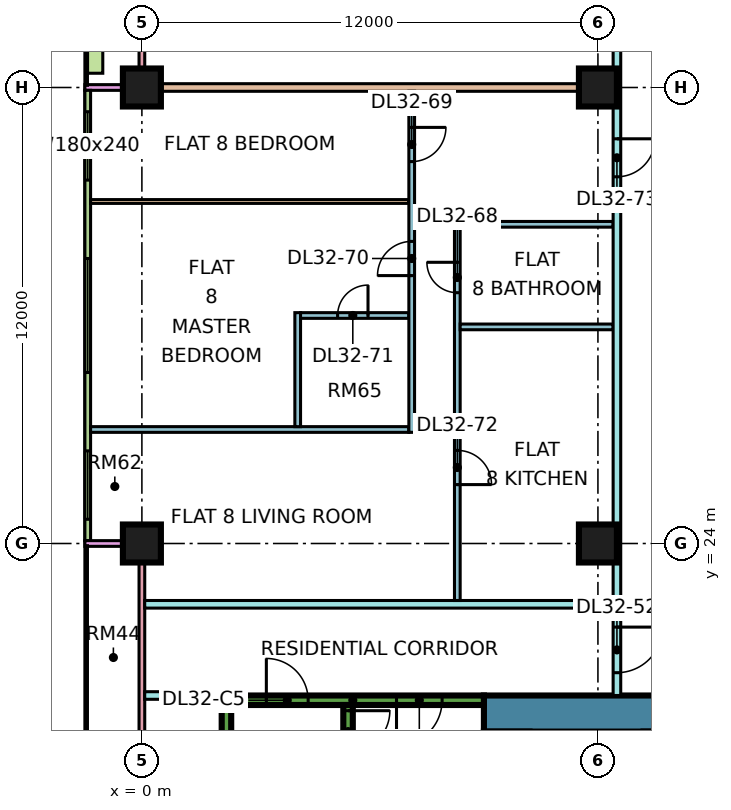
"""IFC4 building model, lengths in metres.
Left out: names, types, materials, properties, quantities, classifications, styles, units other than length and angle.
Written with IfcOpenShell. Run it as: python <this file> out.ifc"""

import sys

from ifc_helpers import new_model, si_unit, direction, frame, frame_2d, origin, origin_2d, place, context, subcontext, project, spatial, rectangle, extrude, element, fill, save


model = new_model("IFC4")
c1 = context("Model", 3, precision=1e-05, world=origin(), true_north=direction((0.0, 1.0)))
c2 = subcontext(c1, "Body", "Model", "MODEL_VIEW")
j1 = project(units=[si_unit("LENGTHUNIT", "METRE"), si_unit("PLANEANGLEUNIT", "RADIAN")], contexts=[c1])
p1 = place(None, origin())
s1 = spatial("IfcSite", under=j1, at=p1, CompositionType="ELEMENT")
p2 = place(p1, origin())
s2 = spatial("IfcBuilding", under=s1, at=p2, CompositionType="ELEMENT")
p3 = place(p2, frame((0.0, 0.0, 136.9)))
s3 = spatial("IfcBuildingStorey", under=s2, at=p3, CompositionType="ELEMENT", Elevation=136.9)
p4 = place(p3, frame((0.0, 24.0, 0.0), z_axis=(0.0, 0.0, 1.0), x_axis=(1.0, 0.0, 0.0)))
e1 = element("IfcColumn", 1, at=p4, inside=s3, PredefinedType="COLUMN", context=c2, shape_type="SweptSolid", body=[
    extrude(rectangle(XDim=1.0, YDim=1.0, at=origin_2d()), origin(), (0.0, 0.0, 1.0), 3.75),
])
p5 = place(p3, frame((0.0, 36.0, 0.0), z_axis=(0.0, 0.0, 1.0), x_axis=(1.0, 0.0, 0.0)))
e2 = element("IfcColumn", 2, at=p5, inside=s3, PredefinedType="COLUMN", context=c2, shape_type="SweptSolid", body=[
    extrude(rectangle(XDim=1.0, YDim=1.0, at=origin_2d()), origin(), (0.0, 0.0, 1.0), 3.75),
])
for number, where, z_axis, x_axis in (
    (3, (12.0, 24.0, 0.0), (0.0, 0.0, 1.0), (1.0, 0.0, 0.0)),
    (4, (12.0, 36.0, 0.0), (0.0, 0.0, 1.0), (1.0, 0.0, 0.0)),
):
    element("IfcColumn", number, at=place(p3, frame(where, z_axis=z_axis, x_axis=x_axis)), inside=s3, PredefinedType="COLUMN", context=c2, shape_type="SweptSolid", body=[
        extrude(rectangle(XDim=1.0, YDim=1.0, at=origin_2d()), origin(), (0.0, 0.0, 1.0), 3.75),
    ])
p6 = place(p3, frame((9.0, 19.525, 0.0), z_axis=(0.0, 0.0, 1.0), x_axis=(1.0, 0.0, 0.0)))
e5 = element("IfcWall", 5, at=p6, inside=s3, PredefinedType="SHEAR", context=c2, shape_type="SweptSolid", body=[
    extrude(rectangle(XDim=25.0, YDim=0.95, at=frame_2d((12.5, 0.0))), origin(), (0.0, 0.0, 1.0), 3.75),
])
p7 = place(p6, frame((19.1, 0.0, 0.0)))
e6 = element("IfcOpeningElement", 6, at=p7, cuts=e5, PredefinedType="OPENING", context=c2, shape_type="SweptSolid", body=[
    extrude(rectangle(XDim=1.8, YDim=2.4, at=frame_2d((0.9, 1.2))), frame((0.0, 0.485, 0.0), z_axis=(0.0, -1.0, 0.0), x_axis=(1.0, 0.0, 0.0)), (0.0, 0.0, 1.0), 0.97),
])
p8 = place(p3, frame((2.1, 19.875, 0.0), z_axis=(0.0, 0.0, 1.0), x_axis=(1.0, 0.0, 0.0)))
e7 = element("IfcWall", 7, at=p8, inside=s3, PredefinedType="SHEAR", context=c2, shape_type="SweptSolid", body=[
    extrude(rectangle(XDim=6.9, YDim=0.25, at=frame_2d((3.45, 0.0))), origin(), (0.0, 0.0, 1.0), 3.75),
])
p9 = place(p8, frame((1.175, 0.0, 0.0)))
e8 = element("IfcOpeningElement", 8, at=p9, cuts=e7, PredefinedType="OPENING", context=c2, shape_type="SweptSolid", body=[
    extrude(rectangle(XDim=1.1, YDim=2.2, at=frame_2d((0.55, 1.1))), frame((0.0, 0.135, 0.0), z_axis=(0.0, -1.0, 0.0), x_axis=(1.0, 0.0, 0.0)), (0.0, 0.0, 1.0), 0.27),
])
p10 = place(p8, frame((4.6, 0.0, 0.0)))
e9 = element("IfcOpeningElement", 9, at=p10, cuts=e7, PredefinedType="OPENING", context=c2, shape_type="SweptSolid", body=[
    extrude(rectangle(XDim=1.2, YDim=2.2, at=frame_2d((0.6, 1.1))), frame((0.0, 0.135, 0.0), z_axis=(0.0, -1.0, 0.0), x_axis=(1.0, 0.0, 0.0)), (0.0, 0.0, 1.0), 0.27),
])
p11 = place(p3, frame((2.225, 13.25, 0.0), z_axis=(0.0, 0.0, 1.0), x_axis=(0.0, 1.0, 0.0)))
e10 = element("IfcWall", 10, at=p11, inside=s3, PredefinedType="SHEAR", context=c2, shape_type="SweptSolid", body=[
    extrude(rectangle(XDim=6.5, YDim=0.25, at=frame_2d((3.25, 0.0))), origin(), (0.0, 0.0, 1.0), 3.75),
])
p12 = place(p3, frame((5.425, 13.25, 0.0), z_axis=(0.0, 0.0, 1.0), x_axis=(0.0, 1.0, 0.0)))
e11 = element("IfcWall", 11, at=p12, inside=s3, PredefinedType="SHEAR", context=c2, shape_type="SweptSolid", body=[
    extrude(rectangle(XDim=6.5, YDim=0.25, at=frame_2d((3.25, 0.0))), origin(), (0.0, 0.0, 1.0), 3.75),
])
p13 = place(p12, frame((5.25, 0.0, 0.0)))
e12 = element("IfcOpeningElement", 12, at=p13, cuts=e11, PredefinedType="OPENING", context=c2, shape_type="SweptSolid", body=[
    extrude(rectangle(XDim=1.1, YDim=2.2, at=frame_2d((0.55, 1.1))), frame((0.0, 0.135, 0.0), z_axis=(0.0, -1.0, 0.0), x_axis=(1.0, 0.0, 0.0)), (0.0, 0.0, 1.0), 0.27),
])
p14 = place(p3, frame((0.0, 47.925, 0.0), z_axis=(0.0, 0.0, 1.0), x_axis=(0.0, -1.0, 0.0)))
e13 = element("IfcWall", 13, at=p14, inside=s3, PredefinedType="SOLIDWALL", context=c2, shape_type="SweptSolid", body=[
    extrude(rectangle(XDim=11.85, YDim=0.15, at=frame_2d((5.925, 0.0))), origin(), (0.0, 0.0, 1.0), 3.3),
])
p15 = place(p14, frame((0.562, 0.0, 0.45)))
e14 = element("IfcOpeningElement", 14, at=p15, cuts=e13, PredefinedType="OPENING", context=c2, shape_type="SweptSolid", body=[
    extrude(rectangle(XDim=1.2, YDim=2.4, at=frame_2d((0.6, 1.2))), frame((0.0, 0.085, 0.0), z_axis=(0.0, -1.0, 0.0), x_axis=(1.0, 0.0, 0.0)), (0.0, 0.0, 1.0), 0.17),
])
p16 = place(p14, frame((4.125, 0.0, 0.0)))
e15 = element("IfcOpeningElement", 15, at=p16, cuts=e13, PredefinedType="OPENING", context=c2, shape_type="SweptSolid", body=[
    extrude(rectangle(XDim=1.2, YDim=2.4, at=frame_2d((0.6, 1.2))), frame((0.0, 0.085, 0.0), z_axis=(0.0, -1.0, 0.0), x_axis=(1.0, 0.0, 0.0)), (0.0, 0.0, 1.0), 0.17),
])
p17 = place(p14, frame((7.125, 0.0, 0.45)))
e16 = element("IfcOpeningElement", 16, at=p17, cuts=e13, PredefinedType="OPENING", context=c2, shape_type="SweptSolid", body=[
    extrude(rectangle(XDim=3.0, YDim=2.4, at=frame_2d((1.5, 1.2))), frame((0.0, 0.085, 0.0), z_axis=(0.0, -1.0, 0.0), x_axis=(1.0, 0.0, 0.0)), (0.0, 0.0, 1.0), 0.17),
])
p18 = place(p3, frame((-1.5, 36.0, 0.0), z_axis=(0.0, 0.0, 1.0), x_axis=(1.0, 0.0, 0.0)))
e17 = element("IfcWall", 17, at=p18, inside=s3, PredefinedType="SOLIDWALL", context=c2, shape_type="SweptSolid", body=[
    extrude(rectangle(XDim=1.5, YDim=0.15, at=frame_2d((0.75, 0.0))), origin(), (0.0, 0.0, 1.0), 3.3),
])
p19 = place(p3, frame((-1.425, 35.925, 0.0), z_axis=(0.0, 0.0, 1.0), x_axis=(0.0, -1.0, 0.0)))
e18 = element("IfcWall", 18, at=p19, inside=s3, PredefinedType="SOLIDWALL", context=c2, shape_type="SweptSolid", body=[
    extrude(rectangle(XDim=11.85, YDim=0.15, at=frame_2d((5.925, 0.0))), origin(), (0.0, 0.0, 1.0), 3.3),
])
p20 = place(p19, frame((0.562, 0.0, 0.45)))
e19 = element("IfcOpeningElement", 19, at=p20, cuts=e18, PredefinedType="OPENING", context=c2, shape_type="SweptSolid", body=[
    extrude(rectangle(XDim=1.8, YDim=2.4, at=frame_2d((0.9, 1.2))), frame((0.0, 0.085, 0.0), z_axis=(0.0, -1.0, 0.0), x_axis=(1.0, 0.0, 0.0)), (0.0, 0.0, 1.0), 0.17),
])
p21 = place(p19, frame((4.425, 0.0, 0.45)))
e20 = element("IfcOpeningElement", 20, at=p21, cuts=e18, PredefinedType="OPENING", context=c2, shape_type="SweptSolid", body=[
    extrude(rectangle(XDim=3.0, YDim=2.4, at=frame_2d((1.5, 1.2))), frame((0.0, 0.085, 0.0), z_axis=(0.0, -1.0, 0.0), x_axis=(1.0, 0.0, 0.0)), (0.0, 0.0, 1.0), 0.17),
])
p22 = place(p19, frame((9.488, 0.0, 0.45)))
e21 = element("IfcOpeningElement", 21, at=p22, cuts=e18, PredefinedType="OPENING", context=c2, shape_type="SweptSolid", body=[
    extrude(rectangle(XDim=1.8, YDim=2.4, at=frame_2d((0.9, 1.2))), frame((0.0, 0.085, 0.0), z_axis=(0.0, -1.0, 0.0), x_axis=(1.0, 0.0, 0.0)), (0.0, 0.0, 1.0), 0.17),
])
p23 = place(p3, frame((0.0, 23.925, 0.0), z_axis=(0.0, 0.0, 1.0), x_axis=(0.0, -1.0, 0.0)))
e22 = element("IfcWall", 22, at=p23, inside=s3, PredefinedType="SOLIDWALL", context=c2, shape_type="SweptSolid", body=[
    extrude(rectangle(XDim=11.35, YDim=0.15, at=frame_2d((5.675, 0.0))), origin(), (0.0, 0.0, 1.0), 3.3),
])
p24 = place(p23, frame((6.738, 0.0, 0.0)))
e23 = element("IfcOpeningElement", 23, at=p24, cuts=e22, PredefinedType="OPENING", context=c2, shape_type="SweptSolid", body=[
    extrude(rectangle(XDim=1.8, YDim=2.4, at=frame_2d((0.9, 1.2))), frame((0.0, 0.085, 0.0), z_axis=(0.0, -1.0, 0.0), x_axis=(1.0, 0.0, 0.0)), (0.0, 0.0, 1.0), 0.17),
])
p25 = place(p3, frame((-1.5, 24.0, 0.0), z_axis=(0.0, 0.0, 1.0), x_axis=(1.0, 0.0, 0.0)))
e24 = element("IfcWall", 24, at=p25, inside=s3, PredefinedType="SOLIDWALL", context=c2, shape_type="SweptSolid", body=[
    extrude(rectangle(XDim=1.5, YDim=0.15, at=frame_2d((0.75, 0.0))), origin(), (0.0, 0.0, 1.0), 3.3),
])
p26 = place(p3, frame((-1.229, 47.625, 0.0), z_axis=(0.0, 0.0, 1.0), x_axis=(0.0, -1.0, 0.0)))
e25 = element("IfcWall", 25, at=p26, inside=s3, PredefinedType="SOLIDWALL", context=c2, shape_type="SweptSolid", body=[
    extrude(rectangle(XDim=11.25, YDim=0.4, at=frame_2d((5.625, 0.0))), origin(), (0.0, 0.0, 1.0), 0.7),
])
p27 = place(p3, frame((-1.351, 33.0, 0.0), z_axis=(0.0, 0.0, 1.0), x_axis=(1.0, 0.0, 0.0)))
e26 = element("IfcWall", 26, at=p27, inside=s3, PredefinedType="PARTITIONING", context=c2, shape_type="SweptSolid", body=[
    extrude(rectangle(XDim=8.376, YDim=0.1, at=frame_2d((4.188, 0.0))), origin(), (0.0, 0.0, 1.0), 3.3),
])
p28 = place(p3, frame((-1.35, 27.0, 0.0), z_axis=(0.0, 0.0, 1.0), x_axis=(1.0, 0.0, 0.0)))
e27 = element("IfcWall", 27, at=p28, inside=s3, PredefinedType="PARTITIONING", context=c2, shape_type="SweptSolid", body=[
    extrude(rectangle(XDim=8.375, YDim=0.15, at=frame_2d((4.188, 0.0))), origin(), (0.0, 0.0, 1.0), 3.3),
])
e28 = element("IfcWall", 28, at=p5, inside=s3, PredefinedType="PARTITIONING", context=c2, shape_type="SweptSolid", body=[
    extrude(rectangle(XDim=12.4, YDim=0.2, at=frame_2d((6.2, 0.0))), origin(), (0.0, 0.0, 1.0), 3.3),
])
p29 = place(p3, frame((0.074, 20.0, 0.0), z_axis=(0.0, 0.0, 1.0), x_axis=(1.0, 0.0, 0.0)))
e29 = element("IfcWall", 29, at=p29, inside=s3, PredefinedType="PARTITIONING", context=c2, shape_type="SweptSolid", body=[
    extrude(rectangle(XDim=2.026, YDim=0.2, at=frame_2d((1.013, 0.0))), origin(), (0.0, 0.0, 1.0), 3.3),
])
p30 = place(p3, frame((0.074, 22.4, 0.0), z_axis=(0.0, 0.0, 1.0), x_axis=(1.0, 0.0, 0.0)))
e30 = element("IfcWall", 30, at=p30, inside=s3, PredefinedType="PARTITIONING", context=c2, shape_type="SweptSolid", body=[
    extrude(rectangle(XDim=12.326, YDim=0.2, at=frame_2d((6.163, 0.0))), origin(), (0.0, 0.0, 1.0), 3.3),
])
p31 = place(p3, frame((4.1, 27.075, 0.0), z_axis=(0.0, 0.0, 1.0), x_axis=(0.0, 1.0, 0.0)))
e31 = element("IfcWall", 31, at=p31, inside=s3, PredefinedType="PARTITIONING", context=c2, shape_type="SweptSolid", body=[
    extrude(rectangle(XDim=3.0, YDim=0.15, at=frame_2d((1.5, 0.0))), origin(), (0.0, 0.0, 1.0), 3.3),
])
p32 = place(p3, frame((4.175, 30.0, 0.0), z_axis=(0.0, 0.0, 1.0), x_axis=(1.0, 0.0, 0.0)))
e32 = element("IfcWall", 32, at=p32, inside=s3, PredefinedType="PARTITIONING", context=c2, shape_type="SweptSolid", body=[
    extrude(rectangle(XDim=2.85, YDim=0.15, at=frame_2d((1.425, 0.0))), origin(), (0.0, 0.0, 1.0), 3.3),
])
p33 = place(p32, frame((0.975, 0.0, 0.0)))
e33 = element("IfcOpeningElement", 33, at=p33, cuts=e32, PredefinedType="OPENING", context=c2, shape_type="SweptSolid", body=[
    extrude(rectangle(XDim=0.8, YDim=2.1, at=frame_2d((0.4, 1.05))), frame((0.0, 0.085, 0.0), z_axis=(0.0, -1.0, 0.0), x_axis=(1.0, 0.0, 0.0)), (0.0, 0.0, 1.0), 0.17),
])
p34 = place(p3, frame((7.1, 26.925, 0.0), z_axis=(0.0, 0.0, 1.0), x_axis=(0.0, 1.0, 0.0)))
e34 = element("IfcWall", 34, at=p34, inside=s3, PredefinedType="PARTITIONING", context=c2, shape_type="SweptSolid", body=[
    extrude(rectangle(XDim=8.975, YDim=0.15, at=frame_2d((4.487, 0.0))), origin(), (0.0, 0.0, 1.0), 3.3),
])
p35 = place(p34, frame((7.125, 0.0, 0.0)))
e35 = element("IfcOpeningElement", 35, at=p35, cuts=e34, PredefinedType="OPENING", context=c2, shape_type="SweptSolid", body=[
    extrude(rectangle(XDim=0.9, YDim=2.1, at=frame_2d((0.45, 1.05))), frame((0.0, 0.085, 0.0), z_axis=(0.0, -1.0, 0.0), x_axis=(1.0, 0.0, 0.0)), (0.0, 0.0, 1.0), 0.17),
])
p36 = place(p34, frame((4.125, 0.0, 0.0)))
e36 = element("IfcOpeningElement", 36, at=p36, cuts=e34, PredefinedType="OPENING", context=c2, shape_type="SweptSolid", body=[
    extrude(rectangle(XDim=0.9, YDim=2.1, at=frame_2d((0.45, 1.05))), frame((0.0, 0.085, 0.0), z_axis=(0.0, -1.0, 0.0), x_axis=(1.0, 0.0, 0.0)), (0.0, 0.0, 1.0), 0.17),
])
p37 = place(p3, frame((8.3, 22.5, 0.0), z_axis=(0.0, 0.0, 1.0), x_axis=(0.0, 1.0, 0.0)))
e37 = element("IfcWall", 37, at=p37, inside=s3, PredefinedType="PARTITIONING", context=c2, shape_type="SweptSolid", body=[
    extrude(rectangle(XDim=9.975, YDim=0.15, at=frame_2d((4.988, 0.0))), origin(), (0.0, 0.0, 1.0), 3.3),
])
p38 = place(p37, frame((8.1, 0.0, 0.0)))
e38 = element("IfcOpeningElement", 38, at=p38, cuts=e37, PredefinedType="OPENING", context=c2, shape_type="SweptSolid", body=[
    extrude(rectangle(XDim=0.8, YDim=2.1, at=frame_2d((0.4, 1.05))), frame((0.0, 0.085, 0.0), z_axis=(0.0, -1.0, 0.0), x_axis=(1.0, 0.0, 0.0)), (0.0, 0.0, 1.0), 0.17),
])
p39 = place(p37, frame((3.05, 0.0, 0.0)))
e39 = element("IfcOpeningElement", 39, at=p39, cuts=e37, PredefinedType="OPENING", context=c2, shape_type="SweptSolid", body=[
    extrude(rectangle(XDim=0.9, YDim=2.1, at=frame_2d((0.45, 1.05))), frame((0.0, 0.085, 0.0), z_axis=(0.0, -1.0, 0.0), x_axis=(1.0, 0.0, 0.0)), (0.0, 0.0, 1.0), 0.17),
])
for number, where, z_axis, x_axis in (
    (40, (8.375, 29.7, 0.0), (0.0, 0.0, 1.0), (1.0, 0.0, 0.0)),
    (41, (8.375, 32.4, 0.0), (0.0, 0.0, 1.0), (1.0, 0.0, 0.0)),
):
    element("IfcWall", number, at=place(p3, frame(where, z_axis=z_axis, x_axis=x_axis)), inside=s3, PredefinedType="PARTITIONING", context=c2, shape_type="SweptSolid", body=[
        extrude(rectangle(XDim=4.025, YDim=0.15, at=frame_2d((2.012, 0.0))), origin(), (0.0, 0.0, 1.0), 3.3),
    ])
p40 = place(p3, frame((12.5, 20.0, 0.0), z_axis=(0.0, 0.0, 1.0), x_axis=(0.0, 1.0, 0.0)))
e42 = element("IfcWall", 42, at=p40, inside=s3, PredefinedType="PARTITIONING", context=c2, shape_type="SweptSolid", body=[
    extrude(rectangle(XDim=42.926, YDim=0.2, at=frame_2d((21.463, 0.0))), origin(), (0.0, 0.0, 1.0), 3.3),
])
p41 = place(p40, frame((17.25, 0.0, 0.0)))
e43 = element("IfcOpeningElement", 43, at=p41, cuts=e42, PredefinedType="OPENING", context=c2, shape_type="SweptSolid", body=[
    extrude(rectangle(XDim=1.0, YDim=2.1, at=frame_2d((0.5, 1.05))), frame((0.0, 0.11, 0.0), z_axis=(0.0, -1.0, 0.0), x_axis=(1.0, 0.0, 0.0)), (0.0, 0.0, 1.0), 0.22),
])
p42 = place(p40, frame((40.8, 0.0, 0.0)))
e44 = element("IfcOpeningElement", 44, at=p42, cuts=e42, PredefinedType="OPENING", context=c2, shape_type="SweptSolid", body=[
    extrude(rectangle(XDim=1.0, YDim=2.1, at=frame_2d((0.5, 1.05))), frame((0.0, 0.11, 0.0), z_axis=(0.0, -1.0, 0.0), x_axis=(1.0, 0.0, 0.0)), (0.0, 0.0, 1.0), 0.22),
])
p43 = place(p40, frame((0.6, 0.0, 0.0)))
e45 = element("IfcOpeningElement", 45, at=p43, cuts=e42, PredefinedType="OPENING", context=c2, shape_type="SweptSolid", body=[
    extrude(rectangle(XDim=1.2, YDim=2.1, at=frame_2d((0.6, 1.05))), frame((0.0, 0.11, 0.0), z_axis=(0.0, -1.0, 0.0), x_axis=(1.0, 0.0, 0.0)), (0.0, 0.0, 1.0), 0.22),
])
p44 = place(p40, frame((13.65, 0.0, 0.0)))
e46 = element("IfcOpeningElement", 46, at=p44, cuts=e42, PredefinedType="OPENING", context=c2, shape_type="SweptSolid", body=[
    extrude(rectangle(XDim=1.0, YDim=2.1, at=frame_2d((0.5, 1.05))), frame((0.0, 0.11, 0.0), z_axis=(0.0, -1.0, 0.0), x_axis=(1.0, 0.0, 0.0)), (0.0, 0.0, 1.0), 0.22),
])
p45 = place(p20, origin())
e47 = element("IfcWindow", 47, at=p45, inside=s3, PartitioningType="SINGLE_PANEL", PredefinedType="WINDOW", context=c2, shape_type="SweptSolid", body=[
    extrude(rectangle(XDim=1.8, YDim=2.4, at=frame_2d((0.9, 1.2))), frame((0.0, 0.03, 0.0), z_axis=(0.0, -1.0, 0.0), x_axis=(1.0, 0.0, 0.0)), (0.0, 0.0, 1.0), 0.06),
])
fill(e19, e47)
p46 = place(p21, origin())
e48 = element("IfcWindow", 48, at=p46, inside=s3, PartitioningType="SINGLE_PANEL", PredefinedType="WINDOW", context=c2, shape_type="SweptSolid", body=[
    extrude(rectangle(XDim=3.0, YDim=2.4, at=frame_2d((1.5, 1.2))), frame((0.0, 0.03, 0.0), z_axis=(0.0, -1.0, 0.0), x_axis=(1.0, 0.0, 0.0)), (0.0, 0.0, 1.0), 0.06),
])
fill(e20, e48)
p47 = place(p22, origin())
e49 = element("IfcWindow", 49, at=p47, inside=s3, PartitioningType="SINGLE_PANEL", PredefinedType="WINDOW", context=c2, shape_type="SweptSolid", body=[
    extrude(rectangle(XDim=1.8, YDim=2.4, at=frame_2d((0.9, 1.2))), frame((0.0, 0.03, 0.0), z_axis=(0.0, -1.0, 0.0), x_axis=(1.0, 0.0, 0.0)), (0.0, 0.0, 1.0), 0.06),
])
fill(e21, e49)
p48 = place(p13, origin())
e50 = element("IfcDoor", 50, at=p48, inside=s3, OperationType="SINGLE_SWING_RIGHT", PredefinedType="DOOR", context=c2, shape_type="SweptSolid", body=[
    extrude(rectangle(XDim=1.1, YDim=2.2, at=frame_2d((0.55, 1.1))), frame((0.0, 0.025, 0.0), z_axis=(0.0, -1.0, 0.0), x_axis=(1.0, 0.0, 0.0)), (0.0, 0.0, 1.0), 0.05),
])
fill(e12, e50)
p49 = place(p9, origin())
e51 = element("IfcDoor", 51, at=p49, inside=s3, OperationType="SINGLE_SWING_LEFT", PredefinedType="DOOR", context=c2, shape_type="SweptSolid", body=[
    extrude(rectangle(XDim=1.1, YDim=2.2, at=frame_2d((0.55, 1.1))), frame((0.0, 0.025, 0.0), z_axis=(0.0, -1.0, 0.0), x_axis=(1.0, 0.0, 0.0)), (0.0, 0.0, 1.0), 0.05),
])
fill(e8, e51)
p50 = place(p10, frame((1.2, 0.0, 0.0), z_axis=(0.0, 0.0, 1.0), x_axis=(-1.0, 0.0, 0.0)))
e52 = element("IfcDoor", 52, at=p50, inside=s3, OperationType="SINGLE_SWING_LEFT", PredefinedType="DOOR", context=c2, shape_type="SweptSolid", body=[
    extrude(rectangle(XDim=1.2, YDim=2.2, at=frame_2d((0.6, 1.1))), frame((0.0, 0.025, 0.0), z_axis=(0.0, -1.0, 0.0), x_axis=(1.0, 0.0, 0.0)), (0.0, 0.0, 1.0), 0.05),
])
fill(e9, e52)
p51 = place(p43, origin())
e53 = element("IfcDoor", 53, at=p51, inside=s3, OperationType="SINGLE_SWING_RIGHT", PredefinedType="DOOR", context=c2, shape_type="SweptSolid", body=[
    extrude(rectangle(XDim=1.2, YDim=2.1, at=frame_2d((0.6, 1.05))), frame((0.0, 0.025, 0.0), z_axis=(0.0, -1.0, 0.0), x_axis=(1.0, 0.0, 0.0)), (0.0, 0.0, 1.0), 0.05),
])
fill(e45, e53)
p52 = place(p38, frame((0.8, 0.0, 0.0), z_axis=(0.0, 0.0, 1.0), x_axis=(-1.0, 0.0, 0.0)))
e54 = element("IfcDoor", 54, at=p52, inside=s3, OperationType="SINGLE_SWING_RIGHT", PredefinedType="DOOR", context=c2, shape_type="SweptSolid", body=[
    extrude(rectangle(XDim=0.8, YDim=2.1, at=frame_2d((0.4, 1.05))), frame((0.0, 0.025, 0.0), z_axis=(0.0, -1.0, 0.0), x_axis=(1.0, 0.0, 0.0)), (0.0, 0.0, 1.0), 0.05),
])
fill(e38, e54)
p53 = place(p35, origin())
e55 = element("IfcDoor", 55, at=p53, inside=s3, OperationType="SINGLE_SWING_RIGHT", PredefinedType="DOOR", context=c2, shape_type="SweptSolid", body=[
    extrude(rectangle(XDim=0.9, YDim=2.1, at=frame_2d((0.45, 1.05))), frame((0.0, 0.025, 0.0), z_axis=(0.0, -1.0, 0.0), x_axis=(1.0, 0.0, 0.0)), (0.0, 0.0, 1.0), 0.05),
])
fill(e35, e55)
p54 = place(p36, origin())
e56 = element("IfcDoor", 56, at=p54, inside=s3, OperationType="SINGLE_SWING_LEFT", PredefinedType="DOOR", context=c2, shape_type="SweptSolid", body=[
    extrude(rectangle(XDim=0.9, YDim=2.1, at=frame_2d((0.45, 1.05))), frame((0.0, 0.025, 0.0), z_axis=(0.0, -1.0, 0.0), x_axis=(1.0, 0.0, 0.0)), (0.0, 0.0, 1.0), 0.05),
])
fill(e36, e56)
p55 = place(p33, frame((0.8, 0.0, 0.0), z_axis=(0.0, 0.0, 1.0), x_axis=(-1.0, 0.0, 0.0)))
e57 = element("IfcDoor", 57, at=p55, inside=s3, OperationType="SINGLE_SWING_RIGHT", PredefinedType="DOOR", context=c2, shape_type="SweptSolid", body=[
    extrude(rectangle(XDim=0.8, YDim=2.1, at=frame_2d((0.4, 1.05))), frame((0.0, 0.025, 0.0), z_axis=(0.0, -1.0, 0.0), x_axis=(1.0, 0.0, 0.0)), (0.0, 0.0, 1.0), 0.05),
])
fill(e33, e57)
p56 = place(p39, frame((0.9, 0.0, 0.0), z_axis=(0.0, 0.0, 1.0), x_axis=(-1.0, 0.0, 0.0)))
e58 = element("IfcDoor", 58, at=p56, inside=s3, OperationType="SINGLE_SWING_LEFT", PredefinedType="DOOR", context=c2, shape_type="SweptSolid", body=[
    extrude(rectangle(XDim=0.9, YDim=2.1, at=frame_2d((0.45, 1.05))), frame((0.0, 0.025, 0.0), z_axis=(0.0, -1.0, 0.0), x_axis=(1.0, 0.0, 0.0)), (0.0, 0.0, 1.0), 0.05),
])
fill(e39, e58)
p57 = place(p44, origin())
e59 = element("IfcDoor", 59, at=p57, inside=s3, OperationType="SINGLE_SWING_RIGHT", PredefinedType="DOOR", context=c2, shape_type="SweptSolid", body=[
    extrude(rectangle(XDim=1.0, YDim=2.1, at=frame_2d((0.5, 1.05))), frame((0.0, 0.025, 0.0), z_axis=(0.0, -1.0, 0.0), x_axis=(1.0, 0.0, 0.0)), (0.0, 0.0, 1.0), 0.05),
])
fill(e46, e59)
save(model, sys.argv[1])
